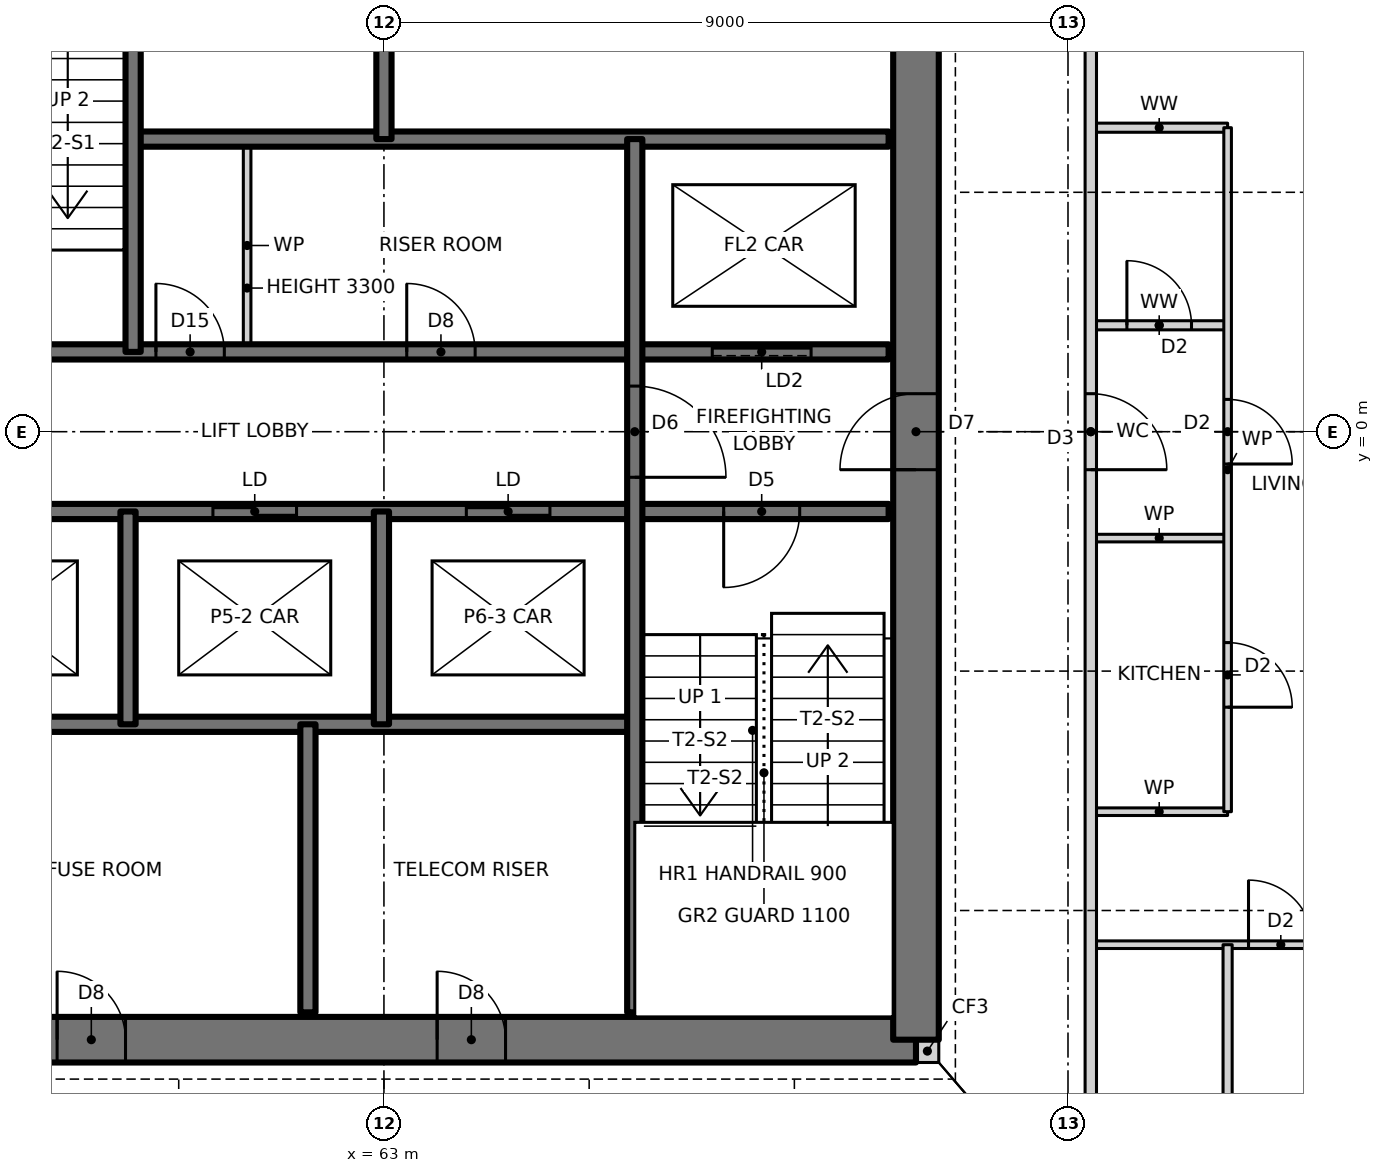
"""IFC4 building model, lengths in metres.
Left out: names, types, materials, properties, quantities, classifications, styles, units other than length and angle.
Written with IfcOpenShell. Run it as: python <this file> out.ifc"""

import sys

from ifc_helpers import new_model, si_unit, direction, frame, frame_2d, origin, place, context, subcontext, project, spatial, rectangle, extrude, element, fill, save


model = new_model("IFC4")
c1 = context("Model", 3, precision=1e-05, world=origin(), true_north=direction((0.0, 1.0)))
c2 = subcontext(c1, "Body", "Model", "MODEL_VIEW")
j1 = project(units=[si_unit("LENGTHUNIT", "METRE"), si_unit("PLANEANGLEUNIT", "RADIAN")], contexts=[c1])
p1 = place(None, origin())
s1 = spatial("IfcSite", under=j1, at=p1, CompositionType="ELEMENT")
p2 = place(p1, origin())
s2 = spatial("IfcBuilding", under=s1, at=p2, CompositionType="ELEMENT")
p3 = place(p2, frame((0.0, 0.0, 71.0)))
s3 = spatial("IfcBuildingStorey", under=s2, at=p3, CompositionType="ELEMENT", Elevation=71.0)
p4 = place(p3, frame((70.0, -8.15, 0.0), z_axis=(0.0, 0.0, 1.0), x_axis=(1.0, 0.0, 0.0)))
e1 = element("IfcWall", 1, at=p4, inside=s3, PredefinedType="SOLIDWALL", context=c2, shape_type="SweptSolid", body=[
    extrude(rectangle(XDim=0.3, YDim=0.3, at=frame_2d((0.15, 0.0))), origin(), (0.0, 0.0, 1.0), 3.5),
])
p5 = place(p3, frame((56.0, -8.0, 0.0), z_axis=(0.0, 0.0, 1.0), x_axis=(1.0, 0.0, 0.0)))
e2 = element("IfcWall", 2, at=p5, inside=s3, PredefinedType="SHEAR", context=c2, shape_type="SweptSolid", body=[
    extrude(rectangle(XDim=14.0, YDim=0.6, at=frame_2d((7.0, 0.0))), origin(), (0.0, 0.0, 1.0), 3.5),
])
p6 = place(p5, frame((2.7, 0.0, 0.0)))
e3 = element("IfcOpeningElement", 3, at=p6, cuts=e2, PredefinedType="OPENING", context=c2, shape_type="SweptSolid", body=[
    extrude(rectangle(XDim=0.9, YDim=2.1, at=frame_2d((0.45, 1.05))), frame((0.0, 0.31, 0.0), z_axis=(0.0, -1.0, 0.0), x_axis=(1.0, 0.0, 0.0)), (0.0, 0.0, 1.0), 0.62),
])
p7 = place(p5, frame((7.7, 0.0, 0.0)))
e4 = element("IfcOpeningElement", 4, at=p7, cuts=e2, PredefinedType="OPENING", context=c2, shape_type="SweptSolid", body=[
    extrude(rectangle(XDim=0.9, YDim=2.1, at=frame_2d((0.45, 1.05))), frame((0.0, 0.31, 0.0), z_axis=(0.0, -1.0, 0.0), x_axis=(1.0, 0.0, 0.0)), (0.0, 0.0, 1.0), 0.62),
])
p8 = place(p3, frame((70.0, -8.0, 0.0), z_axis=(0.0, 0.0, 1.0), x_axis=(0.0, 1.0, 0.0)))
e5 = element("IfcWall", 5, at=p8, inside=s3, PredefinedType="SHEAR", context=c2, shape_type="SweptSolid", body=[
    extrude(rectangle(XDim=16.0, YDim=0.6, at=frame_2d((8.0, 0.0))), origin(), (0.0, 0.0, 1.0), 3.5),
])
p9 = place(p8, frame((7.5, 0.0, 0.0)))
e6 = element("IfcOpeningElement", 6, at=p9, cuts=e5, PredefinedType="OPENING", context=c2, shape_type="SweptSolid", body=[
    extrude(rectangle(XDim=1.0, YDim=2.1, at=frame_2d((0.5, 1.05))), frame((0.0, 0.31, 0.0), z_axis=(0.0, -1.0, 0.0), x_axis=(1.0, 0.0, 0.0)), (0.0, 0.0, 1.0), 0.62),
])
p10 = place(p3, frame((72.3, -6.75, 0.0), z_axis=(0.0, 0.0, 1.0), x_axis=(1.0, 0.0, 0.0)))
e7 = element("IfcWall", 7, at=p10, inside=s3, PredefinedType="PARTITIONING", context=c2, shape_type="SweptSolid", body=[
    extrude(rectangle(XDim=7.14, YDim=0.1, at=frame_2d((3.57, 0.0))), origin(), (0.0, 0.0, 1.0), 3.2),
])
p11 = place(p10, frame((2.075, 0.0, 0.0)))
e8 = element("IfcOpeningElement", 8, at=p11, cuts=e7, PredefinedType="OPENING", context=c2, shape_type="SweptSolid", body=[
    extrude(rectangle(XDim=0.85, YDim=2.1, at=frame_2d((0.425, 1.05))), frame((0.0, 0.06, 0.0), z_axis=(0.0, -1.0, 0.0), x_axis=(1.0, 0.0, 0.0)), (0.0, 0.0, 1.0), 0.12),
])
p12 = place(p3, frame((72.3, -5.0, 0.0), z_axis=(0.0, 0.0, 1.0), x_axis=(1.0, 0.0, 0.0)))
e9 = element("IfcWall", 9, at=p12, inside=s3, PredefinedType="PARTITIONING", context=c2, shape_type="SweptSolid", body=[
    extrude(rectangle(XDim=1.8, YDim=0.1, at=frame_2d((0.9, 0.0))), origin(), (0.0, 0.0, 1.0), 3.2),
])
p13 = place(p3, frame((56.36, -3.85, 0.0), z_axis=(0.0, 0.0, 1.0), x_axis=(1.0, 0.0, 0.0)))
e10 = element("IfcWall", 10, at=p13, inside=s3, PredefinedType="SOLIDWALL", context=c2, shape_type="SweptSolid", body=[
    extrude(rectangle(XDim=9.94, YDim=0.2, at=frame_2d((4.97, 0.0))), origin(), (0.0, 0.0, 1.0), 3.5),
])
p14 = place(p3, frame((72.3, -1.4, 0.0), z_axis=(0.0, 0.0, 1.0), x_axis=(1.0, 0.0, 0.0)))
e11 = element("IfcWall", 11, at=p14, inside=s3, PredefinedType="PARTITIONING", context=c2, shape_type="SweptSolid", body=[
    extrude(rectangle(XDim=1.8, YDim=0.1, at=frame_2d((0.9, 0.0))), origin(), (0.0, 0.0, 1.0), 3.2),
])
p15 = place(p3, frame((56.36, -1.05, 0.0), z_axis=(0.0, 0.0, 1.0), x_axis=(1.0, 0.0, 0.0)))
e12 = element("IfcWall", 12, at=p15, inside=s3, PredefinedType="SOLIDWALL", context=c2, shape_type="SweptSolid", body=[
    extrude(rectangle(XDim=13.28, YDim=0.2, at=frame_2d((6.64, 0.0))), origin(), (0.0, 0.0, 1.0), 3.5),
])
p16 = place(p15, frame((11.11, 0.0, 0.0)))
e13 = element("IfcOpeningElement", 13, at=p16, cuts=e12, PredefinedType="OPENING", context=c2, shape_type="SweptSolid", body=[
    extrude(rectangle(XDim=1.0, YDim=2.1, at=frame_2d((0.5, 1.05))), frame((0.0, 0.11, 0.0), z_axis=(0.0, -1.0, 0.0), x_axis=(1.0, 0.0, 0.0)), (0.0, 0.0, 1.0), 0.22),
])
p17 = place(p15, frame((1.087, 0.0, 0.0)))
e14 = element("IfcOpeningElement", 14, at=p17, cuts=e12, PredefinedType="OPENING", context=c2, shape_type="SweptSolid", body=[
    extrude(rectangle(XDim=1.1, YDim=2.1, at=frame_2d((0.55, 1.05))), frame((0.0, 0.11, 0.0), z_axis=(0.0, -1.0, 0.0), x_axis=(1.0, 0.0, 0.0)), (0.0, 0.0, 1.0), 0.22),
])
p18 = place(p15, frame((4.39, 0.0, 0.0)))
e15 = element("IfcOpeningElement", 15, at=p18, cuts=e12, PredefinedType="OPENING", context=c2, shape_type="SweptSolid", body=[
    extrude(rectangle(XDim=1.1, YDim=2.1, at=frame_2d((0.55, 1.05))), frame((0.0, 0.11, 0.0), z_axis=(0.0, -1.0, 0.0), x_axis=(1.0, 0.0, 0.0)), (0.0, 0.0, 1.0), 0.22),
])
p19 = place(p15, frame((7.724, 0.0, 0.0)))
e16 = element("IfcOpeningElement", 16, at=p19, cuts=e12, PredefinedType="OPENING", context=c2, shape_type="SweptSolid", body=[
    extrude(rectangle(XDim=1.1, YDim=2.1, at=frame_2d((0.55, 1.05))), frame((0.0, 0.11, 0.0), z_axis=(0.0, -1.0, 0.0), x_axis=(1.0, 0.0, 0.0)), (0.0, 0.0, 1.0), 0.22),
])
p20 = place(p3, frame((56.36, 1.05, 0.0), z_axis=(0.0, 0.0, 1.0), x_axis=(1.0, 0.0, 0.0)))
e17 = element("IfcWall", 17, at=p20, inside=s3, PredefinedType="SOLIDWALL", context=c2, shape_type="SweptSolid", body=[
    extrude(rectangle(XDim=13.28, YDim=0.2, at=frame_2d((6.64, 0.0))), origin(), (0.0, 0.0, 1.0), 3.5),
])
p21 = place(p20, frame((1.17, 0.0, 0.0)))
e18 = element("IfcOpeningElement", 18, at=p21, cuts=e17, PredefinedType="OPENING", context=c2, shape_type="SweptSolid", body=[
    extrude(rectangle(XDim=1.0, YDim=2.1, at=frame_2d((0.5, 1.05))), frame((0.0, 0.11, 0.0), z_axis=(0.0, -1.0, 0.0), x_axis=(1.0, 0.0, 0.0)), (0.0, 0.0, 1.0), 0.22),
])
p22 = place(p20, frame((6.94, 0.0, 0.0)))
e19 = element("IfcOpeningElement", 19, at=p22, cuts=e17, PredefinedType="OPENING", context=c2, shape_type="SweptSolid", body=[
    extrude(rectangle(XDim=0.9, YDim=2.1, at=frame_2d((0.45, 1.05))), frame((0.0, 0.11, 0.0), z_axis=(0.0, -1.0, 0.0), x_axis=(1.0, 0.0, 0.0)), (0.0, 0.0, 1.0), 0.22),
])
p23 = place(p20, frame((3.64, 0.0, 0.0)))
e20 = element("IfcOpeningElement", 20, at=p23, cuts=e17, PredefinedType="OPENING", context=c2, shape_type="SweptSolid", body=[
    extrude(rectangle(XDim=0.9, YDim=2.1, at=frame_2d((0.45, 1.05))), frame((0.0, 0.11, 0.0), z_axis=(0.0, -1.0, 0.0), x_axis=(1.0, 0.0, 0.0)), (0.0, 0.0, 1.0), 0.22),
])
p24 = place(p20, frame((10.96, 0.0, 0.0)))
e21 = element("IfcOpeningElement", 21, at=p24, cuts=e17, PredefinedType="OPENING", context=c2, shape_type="SweptSolid", body=[
    extrude(rectangle(XDim=1.3, YDim=2.1, at=frame_2d((0.65, 1.05))), frame((0.0, 0.11, 0.0), z_axis=(0.0, -1.0, 0.0), x_axis=(1.0, 0.0, 0.0)), (0.0, 0.0, 1.0), 0.22),
])
p25 = place(p3, frame((72.3, 1.4, 0.0), z_axis=(0.0, 0.0, 1.0), x_axis=(1.0, 0.0, 0.0)))
e22 = element("IfcWall", 22, at=p25, inside=s3, PredefinedType="PARTITIONING", context=c2, shape_type="SweptSolid", body=[
    extrude(rectangle(XDim=1.8, YDim=0.12, at=frame_2d((0.9, 0.0))), origin(), (0.0, 0.0, 1.0), 3.2),
])
p26 = place(p25, frame((0.475, 0.0, 0.0)))
e23 = element("IfcOpeningElement", 23, at=p26, cuts=e22, PredefinedType="OPENING", context=c2, shape_type="SweptSolid", body=[
    extrude(rectangle(XDim=0.85, YDim=2.1, at=frame_2d((0.425, 1.05))), frame((0.0, 0.07, 0.0), z_axis=(0.0, -1.0, 0.0), x_axis=(1.0, 0.0, 0.0)), (0.0, 0.0, 1.0), 0.14),
])
p27 = place(p3, frame((59.7, 3.85, 0.0), z_axis=(0.0, 0.0, 1.0), x_axis=(1.0, 0.0, 0.0)))
e24 = element("IfcWall", 24, at=p27, inside=s3, PredefinedType="SOLIDWALL", context=c2, shape_type="SweptSolid", body=[
    extrude(rectangle(XDim=9.94, YDim=0.2, at=frame_2d((4.97, 0.0))), origin(), (0.0, 0.0, 1.0), 3.5),
])
p28 = place(p3, frame((72.3, 4.0, 0.0), z_axis=(0.0, 0.0, 1.0), x_axis=(1.0, 0.0, 0.0)))
e25 = element("IfcWall", 25, at=p28, inside=s3, PredefinedType="PARTITIONING", context=c2, shape_type="SweptSolid", body=[
    extrude(rectangle(XDim=1.8, YDim=0.12, at=frame_2d((0.9, 0.0))), origin(), (0.0, 0.0, 1.0), 3.2),
])
p29 = place(p3, frame((74.1, -12.614, 0.0), z_axis=(0.0, 0.0, 1.0), x_axis=(0.0, 1.0, 0.0)))
e26 = element("IfcWall", 26, at=p29, inside=s3, PredefinedType="PARTITIONING", context=c2, shape_type="SweptSolid", body=[
    extrude(rectangle(XDim=5.864, YDim=0.12, at=frame_2d((2.932, 0.0))), origin(), (0.0, 0.0, 1.0), 3.2),
])
p30 = place(p29, frame((2.507, 0.0, 0.0)))
e27 = element("IfcOpeningElement", 27, at=p30, cuts=e26, PredefinedType="OPENING", context=c2, shape_type="SweptSolid", body=[
    extrude(rectangle(XDim=0.85, YDim=2.1, at=frame_2d((0.425, 1.05))), frame((0.0, 0.07, 0.0), z_axis=(0.0, -1.0, 0.0), x_axis=(1.0, 0.0, 0.0)), (0.0, 0.0, 1.0), 0.14),
])
p31 = place(p3, frame((74.1, -5.0, 0.0), z_axis=(0.0, 0.0, 1.0), x_axis=(0.0, 1.0, 0.0)))
e28 = element("IfcWall", 28, at=p31, inside=s3, PredefinedType="PARTITIONING", context=c2, shape_type="SweptSolid", body=[
    extrude(rectangle(XDim=9.0, YDim=0.1, at=frame_2d((4.5, 0.0))), origin(), (0.0, 0.0, 1.0), 3.2),
])
p32 = place(p31, frame((1.375, 0.0, 0.0)))
e29 = element("IfcOpeningElement", 29, at=p32, cuts=e28, PredefinedType="OPENING", context=c2, shape_type="SweptSolid", body=[
    extrude(rectangle(XDim=0.85, YDim=2.1, at=frame_2d((0.425, 1.05))), frame((0.0, 0.06, 0.0), z_axis=(0.0, -1.0, 0.0), x_axis=(1.0, 0.0, 0.0)), (0.0, 0.0, 1.0), 0.12),
])
p33 = place(p31, frame((4.575, 0.0, 0.0)))
e30 = element("IfcOpeningElement", 30, at=p33, cuts=e28, PredefinedType="OPENING", context=c2, shape_type="SweptSolid", body=[
    extrude(rectangle(XDim=0.85, YDim=2.1, at=frame_2d((0.425, 1.05))), frame((0.0, 0.06, 0.0), z_axis=(0.0, -1.0, 0.0), x_axis=(1.0, 0.0, 0.0)), (0.0, 0.0, 1.0), 0.12),
])
p34 = place(p3, frame((72.3, -10.568, 0.0), z_axis=(0.0, 0.0, 1.0), x_axis=(0.0, 1.0, 0.0)))
e31 = element("IfcWall", 31, at=p34, inside=s3, PredefinedType="PARTITIONING", context=c2, shape_type="SweptSolid", body=[
    extrude(rectangle(XDim=21.136, YDim=0.15, at=frame_2d((10.568, 0.0))), origin(), (0.0, 0.0, 1.0), 3.2),
])
p35 = place(p34, frame((10.068, 0.0, 0.0)))
e32 = element("IfcOpeningElement", 32, at=p35, cuts=e31, PredefinedType="OPENING", context=c2, shape_type="SweptSolid", body=[
    extrude(rectangle(XDim=1.0, YDim=2.1, at=frame_2d((0.5, 1.05))), frame((0.0, 0.085, 0.0), z_axis=(0.0, -1.0, 0.0), x_axis=(1.0, 0.0, 0.0)), (0.0, 0.0, 1.0), 0.17),
])
p36 = place(p3, frame((66.3, -7.64, 0.0), z_axis=(0.0, 0.0, 1.0), x_axis=(0.0, 1.0, 0.0)))
e33 = element("IfcWall", 33, at=p36, inside=s3, PredefinedType="SOLIDWALL", context=c2, shape_type="SweptSolid", body=[
    extrude(rectangle(XDim=11.49, YDim=0.2, at=frame_2d((5.745, 0.0))), origin(), (0.0, 0.0, 1.0), 3.5),
])
p37 = place(p36, frame((7.04, 0.0, 0.0)))
e34 = element("IfcOpeningElement", 34, at=p37, cuts=e33, PredefinedType="OPENING", context=c2, shape_type="SweptSolid", body=[
    extrude(rectangle(XDim=1.2, YDim=2.1, at=frame_2d((0.6, 1.05))), frame((0.0, 0.11, 0.0), z_axis=(0.0, -1.0, 0.0), x_axis=(1.0, 0.0, 0.0)), (0.0, 0.0, 1.0), 0.22),
])
p38 = place(p3, frame((63.0, 3.85, 0.0), z_axis=(0.0, 0.0, 1.0), x_axis=(0.0, 1.0, 0.0)))
e35 = element("IfcWall", 35, at=p38, inside=s3, PredefinedType="SOLIDWALL", context=c2, shape_type="SweptSolid", body=[
    extrude(rectangle(XDim=3.79, YDim=0.2, at=frame_2d((1.895, 0.0))), origin(), (0.0, 0.0, 1.0), 3.5),
])
p39 = place(p3, frame((62.967, -3.85, 0.0), z_axis=(0.0, 0.0, 1.0), x_axis=(0.0, 1.0, 0.0)))
e36 = element("IfcWall", 36, at=p39, inside=s3, PredefinedType="SOLIDWALL", context=c2, shape_type="SweptSolid", body=[
    extrude(rectangle(XDim=2.8, YDim=0.2, at=frame_2d((1.4, 0.0))), origin(), (0.0, 0.0, 1.0), 3.5),
])
p40 = place(p3, frame((62.0, -7.64, 0.0), z_axis=(0.0, 0.0, 1.0), x_axis=(0.0, 1.0, 0.0)))
e37 = element("IfcWall", 37, at=p40, inside=s3, PredefinedType="SOLIDWALL", context=c2, shape_type="SweptSolid", body=[
    extrude(rectangle(XDim=3.79, YDim=0.2, at=frame_2d((1.895, 0.0))), origin(), (0.0, 0.0, 1.0), 3.5),
])
p41 = place(p3, frame((61.2, 1.05, 0.0), z_axis=(0.0, 0.0, 1.0), x_axis=(0.0, 1.0, 0.0)))
e38 = element("IfcWall", 38, at=p41, inside=s3, PredefinedType="PARTITIONING", context=c2, shape_type="SweptSolid", body=[
    extrude(rectangle(XDim=2.8, YDim=0.1, at=frame_2d((1.4, 0.0))), origin(), (0.0, 0.0, 1.0), 3.3),
])
p42 = place(p3, frame((59.7, 1.05, 0.0), z_axis=(0.0, 0.0, 1.0), x_axis=(0.0, 1.0, 0.0)))
e39 = element("IfcWall", 39, at=p42, inside=s3, PredefinedType="SOLIDWALL", context=c2, shape_type="SweptSolid", body=[
    extrude(rectangle(XDim=6.59, YDim=0.2, at=frame_2d((3.295, 0.0))), origin(), (0.0, 0.0, 1.0), 3.5),
])
p43 = place(p3, frame((59.633, -3.85, 0.0), z_axis=(0.0, 0.0, 1.0), x_axis=(0.0, 1.0, 0.0)))
e40 = element("IfcWall", 40, at=p43, inside=s3, PredefinedType="SOLIDWALL", context=c2, shape_type="SweptSolid", body=[
    extrude(rectangle(XDim=2.8, YDim=0.2, at=frame_2d((1.4, 0.0))), origin(), (0.0, 0.0, 1.0), 3.5),
])
p44 = place(p16, frame((1.0, 0.0, 0.0), z_axis=(0.0, 0.0, 1.0), x_axis=(-1.0, 0.0, 0.0)))
e41 = element("IfcDoor", 41, at=p44, inside=s3, OperationType="SINGLE_SWING_RIGHT", PredefinedType="DOOR", context=c2, shape_type="SweptSolid", body=[
    extrude(rectangle(XDim=1.0, YDim=2.1, at=frame_2d((0.5, 1.05))), frame((0.0, 0.025, 0.0), z_axis=(0.0, -1.0, 0.0), x_axis=(1.0, 0.0, 0.0)), (0.0, 0.0, 1.0), 0.05),
])
fill(e13, e41)
p45 = place(p37, frame((1.2, 0.0, 0.0), z_axis=(0.0, 0.0, 1.0), x_axis=(-1.0, 0.0, 0.0)))
e42 = element("IfcDoor", 42, at=p45, inside=s3, OperationType="SINGLE_SWING_RIGHT", PredefinedType="DOOR", context=c2, shape_type="SweptSolid", body=[
    extrude(rectangle(XDim=1.2, YDim=2.1, at=frame_2d((0.6, 1.05))), frame((0.0, 0.025, 0.0), z_axis=(0.0, -1.0, 0.0), x_axis=(1.0, 0.0, 0.0)), (0.0, 0.0, 1.0), 0.05),
])
fill(e34, e42)
p46 = place(p22, origin())
e43 = element("IfcDoor", 43, at=p46, inside=s3, OperationType="SINGLE_SWING_LEFT", PredefinedType="DOOR", context=c2, shape_type="SweptSolid", body=[
    extrude(rectangle(XDim=0.9, YDim=2.1, at=frame_2d((0.45, 1.05))), frame((0.0, 0.025, 0.0), z_axis=(0.0, -1.0, 0.0), x_axis=(1.0, 0.0, 0.0)), (0.0, 0.0, 1.0), 0.05),
])
fill(e19, e43)
p47 = place(p23, origin())
e44 = element("IfcDoor", 44, at=p47, inside=s3, OperationType="SINGLE_SWING_LEFT", PredefinedType="DOOR", context=c2, shape_type="SweptSolid", body=[
    extrude(rectangle(XDim=0.9, YDim=2.1, at=frame_2d((0.45, 1.05))), frame((0.0, 0.025, 0.0), z_axis=(0.0, -1.0, 0.0), x_axis=(1.0, 0.0, 0.0)), (0.0, 0.0, 1.0), 0.05),
])
fill(e20, e44)
p48 = place(p32, frame((0.85, 0.0, 0.0), z_axis=(0.0, 0.0, 1.0), x_axis=(-1.0, 0.0, 0.0)))
e45 = element("IfcDoor", 45, at=p48, inside=s3, OperationType="SINGLE_SWING_RIGHT", PredefinedType="DOOR", context=c2, shape_type="SweptSolid", body=[
    extrude(rectangle(XDim=0.85, YDim=2.1, at=frame_2d((0.425, 1.05))), frame((0.0, 0.025, 0.0), z_axis=(0.0, -1.0, 0.0), x_axis=(1.0, 0.0, 0.0)), (0.0, 0.0, 1.0), 0.05),
])
fill(e29, e45)
p49 = place(p35, frame((1.0, 0.0, 0.0), z_axis=(0.0, 0.0, 1.0), x_axis=(-1.0, 0.0, 0.0)))
e46 = element("IfcDoor", 46, at=p49, inside=s3, OperationType="SINGLE_SWING_RIGHT", PredefinedType="DOOR", context=c2, shape_type="SweptSolid", body=[
    extrude(rectangle(XDim=1.0, YDim=2.1, at=frame_2d((0.5, 1.05))), frame((0.0, 0.025, 0.0), z_axis=(0.0, -1.0, 0.0), x_axis=(1.0, 0.0, 0.0)), (0.0, 0.0, 1.0), 0.05),
])
fill(e32, e46)
p50 = place(p33, frame((0.85, 0.0, 0.0), z_axis=(0.0, 0.0, 1.0), x_axis=(-1.0, 0.0, 0.0)))
e47 = element("IfcDoor", 47, at=p50, inside=s3, OperationType="SINGLE_SWING_RIGHT", PredefinedType="DOOR", context=c2, shape_type="SweptSolid", body=[
    extrude(rectangle(XDim=0.85, YDim=2.1, at=frame_2d((0.425, 1.05))), frame((0.0, 0.025, 0.0), z_axis=(0.0, -1.0, 0.0), x_axis=(1.0, 0.0, 0.0)), (0.0, 0.0, 1.0), 0.05),
])
fill(e30, e47)
p51 = place(p26, origin())
e48 = element("IfcDoor", 48, at=p51, inside=s3, OperationType="SINGLE_SWING_LEFT", PredefinedType="DOOR", context=c2, shape_type="SweptSolid", body=[
    extrude(rectangle(XDim=0.85, YDim=2.1, at=frame_2d((0.425, 1.05))), frame((0.0, 0.025, 0.0), z_axis=(0.0, -1.0, 0.0), x_axis=(1.0, 0.0, 0.0)), (0.0, 0.0, 1.0), 0.05),
])
fill(e23, e48)
p52 = place(p11, origin())
e49 = element("IfcDoor", 49, at=p52, inside=s3, OperationType="SINGLE_SWING_LEFT", PredefinedType="DOOR", context=c2, shape_type="SweptSolid", body=[
    extrude(rectangle(XDim=0.85, YDim=2.1, at=frame_2d((0.425, 1.05))), frame((0.0, 0.025, 0.0), z_axis=(0.0, -1.0, 0.0), x_axis=(1.0, 0.0, 0.0)), (0.0, 0.0, 1.0), 0.05),
])
fill(e8, e49)
p53 = place(p9, origin())
e50 = element("IfcDoor", 50, at=p53, inside=s3, OperationType="SINGLE_SWING_LEFT", PredefinedType="DOOR", context=c2, shape_type="SweptSolid", body=[
    extrude(rectangle(XDim=1.0, YDim=2.1, at=frame_2d((0.5, 1.05))), frame((0.0, 0.025, 0.0), z_axis=(0.0, -1.0, 0.0), x_axis=(1.0, 0.0, 0.0)), (0.0, 0.0, 1.0), 0.05),
])
fill(e6, e50)
p54 = place(p6, origin())
e51 = element("IfcDoor", 51, at=p54, inside=s3, OperationType="SINGLE_SWING_LEFT", PredefinedType="DOOR", context=c2, shape_type="SweptSolid", body=[
    extrude(rectangle(XDim=0.9, YDim=2.1, at=frame_2d((0.45, 1.05))), frame((0.0, 0.025, 0.0), z_axis=(0.0, -1.0, 0.0), x_axis=(1.0, 0.0, 0.0)), (0.0, 0.0, 1.0), 0.05),
])
fill(e3, e51)
p55 = place(p7, origin())
e52 = element("IfcDoor", 52, at=p55, inside=s3, OperationType="SINGLE_SWING_LEFT", PredefinedType="DOOR", context=c2, shape_type="SweptSolid", body=[
    extrude(rectangle(XDim=0.9, YDim=2.1, at=frame_2d((0.45, 1.05))), frame((0.0, 0.025, 0.0), z_axis=(0.0, -1.0, 0.0), x_axis=(1.0, 0.0, 0.0)), (0.0, 0.0, 1.0), 0.05),
])
fill(e4, e52)
p56 = place(p18, origin())
e53 = element("IfcDoor", 53, at=p56, inside=s3, OperationType="DOUBLE_DOOR_SLIDING", PredefinedType="DOOR", context=c2, shape_type="SweptSolid", body=[
    extrude(rectangle(XDim=1.1, YDim=2.1, at=frame_2d((0.55, 1.05))), frame((0.0, 0.025, 0.0), z_axis=(0.0, -1.0, 0.0), x_axis=(1.0, 0.0, 0.0)), (0.0, 0.0, 1.0), 0.05),
])
fill(e15, e53)
p57 = place(p19, origin())
e54 = element("IfcDoor", 54, at=p57, inside=s3, OperationType="DOUBLE_DOOR_SLIDING", PredefinedType="DOOR", context=c2, shape_type="SweptSolid", body=[
    extrude(rectangle(XDim=1.1, YDim=2.1, at=frame_2d((0.55, 1.05))), frame((0.0, 0.025, 0.0), z_axis=(0.0, -1.0, 0.0), x_axis=(1.0, 0.0, 0.0)), (0.0, 0.0, 1.0), 0.05),
])
fill(e16, e54)
p58 = place(p24, origin())
e55 = element("IfcDoor", 55, at=p58, inside=s3, OperationType="SLIDING_TO_LEFT", PredefinedType="DOOR", context=c2, shape_type="SweptSolid", body=[
    extrude(rectangle(XDim=1.3, YDim=2.1, at=frame_2d((0.65, 1.05))), frame((0.0, 0.025, 0.0), z_axis=(0.0, -1.0, 0.0), x_axis=(1.0, 0.0, 0.0)), (0.0, 0.0, 1.0), 0.05),
])
fill(e21, e55)
save(model, sys.argv[1])
